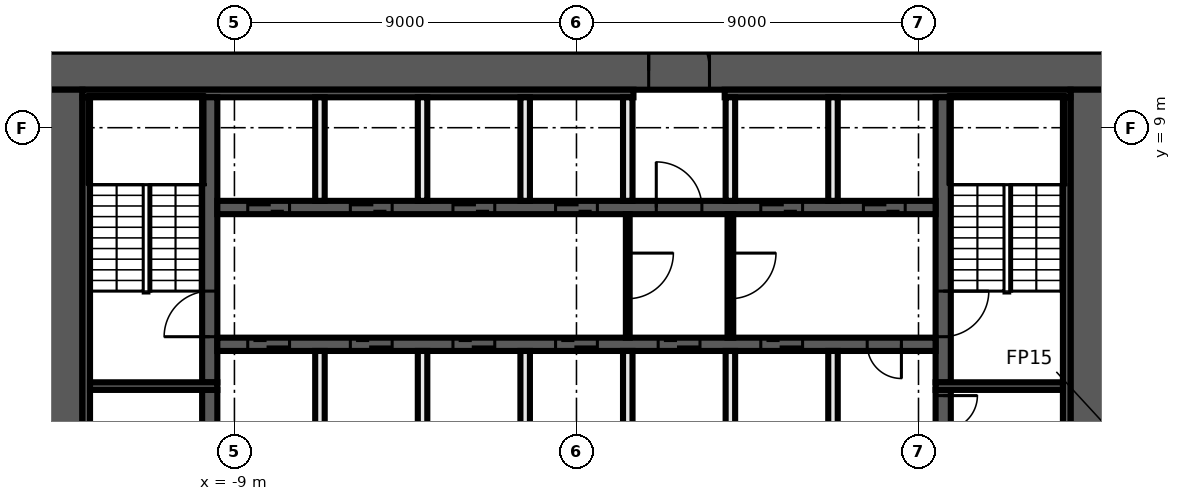
"""IFC4 building model, lengths in metres.
Left out: names, types, materials, properties, quantities, classifications, styles, units other than length and angle.
Written with IfcOpenShell. Run it as: python <this file> out.ifc"""

import sys

from ifc_helpers import new_model, si_unit, direction, frame, frame_2d, origin, place, context, subcontext, project, spatial, rectangle, extrude, element, fill, save


model = new_model("IFC4")
c1 = context("Model", 3, precision=1e-05, world=origin(), true_north=direction((0.0, 1.0)))
c2 = subcontext(c1, "Body", "Model", "MODEL_VIEW")
j1 = project(units=[si_unit("LENGTHUNIT", "METRE"), si_unit("PLANEANGLEUNIT", "RADIAN")], contexts=[c1])
p1 = place(None, origin())
s1 = spatial("IfcSite", under=j1, at=p1, CompositionType="ELEMENT")
p2 = place(p1, origin())
s2 = spatial("IfcBuilding", under=s1, at=p2, CompositionType="ELEMENT")
p3 = place(p2, frame((0.0, 0.0, 132.2)))
s3 = spatial("IfcBuildingStorey", under=s2, at=p3, CompositionType="ELEMENT", Elevation=132.2)
for number, where, z_axis, x_axis in (
    (1, (3.6, 11.0, 0.0), (0.0, 0.0, 1.0), (0.0, 1.0, 0.0)),
    (2, (1.8, 11.0, 0.0), (0.0, 0.0, 1.0), (0.0, 1.0, 0.0)),
):
    element("IfcWall", number, at=place(p3, frame(where, z_axis=z_axis, x_axis=x_axis)), inside=s3, PredefinedType="PARTITIONING", context=c2, shape_type="SweptSolid", body=[
        extrude(rectangle(XDim=0.925, YDim=0.15, at=frame_2d((0.462, 0.0))), origin(), (0.0, 0.0, 1.0), 3.3),
    ])
p4 = place(p3, frame((-14.0, 10.5, 0.0), z_axis=(0.0, 0.0, 1.0), x_axis=(1.0, 0.0, 0.0)))
e3 = element("IfcWall", 3, at=p4, inside=s3, PredefinedType="SHEAR", context=c2, shape_type="SweptSolid", body=[
    extrude(rectangle(XDim=28.0, YDim=1.0, at=frame_2d((14.0, 0.0))), origin(), (0.0, 0.0, 1.0), 3.3),
])
p5 = place(p4, frame((15.9, 0.0, 0.0)))
e4 = element("IfcOpeningElement", 4, at=p5, cuts=e3, PredefinedType="OPENING", context=c2, shape_type="SweptSolid", body=[
    extrude(rectangle(XDim=1.6, YDim=2.1, at=frame_2d((0.8, 1.05))), frame((0.0, 0.51, 0.0), z_axis=(0.0, -1.0, 0.0), x_axis=(1.0, 0.0, 0.0)), (0.0, 0.0, 1.0), 1.02),
])
for number, where, z_axis, x_axis in (
    (5, (13.5, 10.0, 0.0), (0.0, 0.0, 1.0), (0.0, -1.0, 0.0)),
    (6, (-13.5, -10.0, 0.0), (0.0, 0.0, 1.0), (0.0, 1.0, 0.0)),
):
    element("IfcWall", number, at=place(p3, frame(where, z_axis=z_axis, x_axis=x_axis)), inside=s3, PredefinedType="SHEAR", context=c2, shape_type="SweptSolid", body=[
        extrude(rectangle(XDim=20.0, YDim=1.0, at=frame_2d((10.0, 0.0))), origin(), (0.0, 0.0, 1.0), 3.3),
    ])
p6 = place(p3, frame((-13.0, 9.9, 0.0), z_axis=(0.0, 0.0, 1.0), x_axis=(1.0, 0.0, 0.0)))
e7 = element("IfcWall", 7, at=p6, inside=s3, PredefinedType="SHEAR", context=c2, shape_type="SweptSolid", body=[
    extrude(rectangle(XDim=14.5, YDim=0.2, at=frame_2d((7.25, 0.0))), origin(), (0.0, 0.0, 1.0), 3.3),
])
p7 = place(p3, frame((3.9, 9.9, 0.0), z_axis=(0.0, 0.0, 1.0), x_axis=(1.0, 0.0, 0.0)))
e8 = element("IfcWall", 8, at=p7, inside=s3, PredefinedType="SHEAR", context=c2, shape_type="SweptSolid", body=[
    extrude(rectangle(XDim=9.1, YDim=0.2, at=frame_2d((4.55, 0.0))), origin(), (0.0, 0.0, 1.0), 3.3),
])
for number, where, z_axis, x_axis in (
    (9, (12.9, 9.8, 0.0), (0.0, 0.0, 1.0), (0.0, -1.0, 0.0)),
    (10, (-12.9, -9.8, 0.0), (0.0, 0.0, 1.0), (0.0, 1.0, 0.0)),
):
    element("IfcWall", number, at=place(p3, frame(where, z_axis=z_axis, x_axis=x_axis)), inside=s3, PredefinedType="SHEAR", context=c2, shape_type="SweptSolid", body=[
        extrude(rectangle(XDim=19.6, YDim=0.2, at=frame_2d((9.8, 0.0))), origin(), (0.0, 0.0, 1.0), 3.3),
    ])
p8 = place(p3, frame((9.65, 2.1, 0.0), z_axis=(0.0, 0.0, 1.0), x_axis=(0.0, -1.0, 0.0)))
e11 = element("IfcWall", 11, at=p8, inside=s3, PredefinedType="SHEAR", context=c2, shape_type="SweptSolid", body=[
    extrude(rectangle(XDim=4.2, YDim=0.4, at=frame_2d((2.1, 0.0))), origin(), (0.0, 0.0, 1.0), 3.3),
])
p9 = place(p8, frame((0.15, 0.0, 0.0)))
e12 = element("IfcOpeningElement", 12, at=p9, cuts=e11, PredefinedType="OPENING", context=c2, shape_type="SweptSolid", body=[
    extrude(rectangle(XDim=0.9, YDim=2.1, at=frame_2d((0.45, 1.05))), frame((0.0, 0.21, 0.0), z_axis=(0.0, -1.0, 0.0), x_axis=(1.0, 0.0, 0.0)), (0.0, 0.0, 1.0), 0.42),
])
p10 = place(p3, frame((9.65, 9.8, 0.0), z_axis=(0.0, 0.0, 1.0), x_axis=(0.0, -1.0, 0.0)))
e13 = element("IfcWall", 13, at=p10, inside=s3, PredefinedType="SHEAR", context=c2, shape_type="SweptSolid", body=[
    extrude(rectangle(XDim=7.5, YDim=0.4, at=frame_2d((3.75, 0.0))), origin(), (0.0, 0.0, 1.0), 3.3),
])
p11 = place(p10, frame((5.1, 0.0, 0.0)))
e14 = element("IfcOpeningElement", 14, at=p11, cuts=e13, PredefinedType="OPENING", context=c2, shape_type="SweptSolid", body=[
    extrude(rectangle(XDim=1.2, YDim=2.1, at=frame_2d((0.6, 1.05))), frame((0.0, 0.21, 0.0), z_axis=(0.0, -1.0, 0.0), x_axis=(1.0, 0.0, 0.0)), (0.0, 0.0, 1.0), 0.42),
])
p12 = place(p3, frame((-9.65, -2.1, 0.0), z_axis=(0.0, 0.0, 1.0), x_axis=(0.0, 1.0, 0.0)))
e15 = element("IfcWall", 15, at=p12, inside=s3, PredefinedType="SHEAR", context=c2, shape_type="SweptSolid", body=[
    extrude(rectangle(XDim=4.2, YDim=0.4, at=frame_2d((2.1, 0.0))), origin(), (0.0, 0.0, 1.0), 3.3),
])
p13 = place(p3, frame((-9.65, 2.3, 0.0), z_axis=(0.0, 0.0, 1.0), x_axis=(0.0, 1.0, 0.0)))
e16 = element("IfcWall", 16, at=p13, inside=s3, PredefinedType="SHEAR", context=c2, shape_type="SweptSolid", body=[
    extrude(rectangle(XDim=7.5, YDim=0.4, at=frame_2d((3.75, 0.0))), origin(), (0.0, 0.0, 1.0), 3.3),
])
p14 = place(p13, frame((1.2, 0.0, 0.0)))
e17 = element("IfcOpeningElement", 17, at=p14, cuts=e16, PredefinedType="OPENING", context=c2, shape_type="SweptSolid", body=[
    extrude(rectangle(XDim=1.2, YDim=2.1, at=frame_2d((0.6, 1.05))), frame((0.0, 0.21, 0.0), z_axis=(0.0, -1.0, 0.0), x_axis=(1.0, 0.0, 0.0)), (0.0, 0.0, 1.0), 0.42),
])
for number, where, z_axis, x_axis in (
    (18, (9.45, 2.2, 0.0), (0.0, 0.0, 1.0), (1.0, 0.0, 0.0)),
    (19, (-9.45, 2.2, 0.0), (0.0, 0.0, 1.0), (-1.0, 0.0, 0.0)),
):
    element("IfcWall", number, at=place(p3, frame(where, z_axis=z_axis, x_axis=x_axis)), inside=s3, PredefinedType="SHEAR", context=c2, shape_type="SweptSolid", body=[
        extrude(rectangle(XDim=3.35, YDim=0.2, at=frame_2d((1.675, 0.0))), origin(), (0.0, 0.0, 1.0), 3.3),
    ])
p15 = place(p3, frame((-9.45, 6.9, 0.0), z_axis=(0.0, 0.0, 1.0), x_axis=(1.0, 0.0, 0.0)))
e20 = element("IfcWall", 20, at=p15, inside=s3, PredefinedType="SHEAR", context=c2, shape_type="SweptSolid", body=[
    extrude(rectangle(XDim=18.9, YDim=0.35, at=frame_2d((9.45, 0.0))), origin(), (0.0, 0.0, 1.0), 3.3),
])
p16 = place(p15, frame((0.8, 0.0, 0.0)))
e21 = element("IfcOpeningElement", 21, at=p16, cuts=e20, PredefinedType="OPENING", context=c2, shape_type="SweptSolid", body=[
    extrude(rectangle(XDim=1.1, YDim=2.1, at=frame_2d((0.55, 1.05))), frame((0.0, 0.185, 0.0), z_axis=(0.0, -1.0, 0.0), x_axis=(1.0, 0.0, 0.0)), (0.0, 0.0, 1.0), 0.37),
])
p17 = place(p15, frame((3.5, 0.0, 0.0)))
e22 = element("IfcOpeningElement", 22, at=p17, cuts=e20, PredefinedType="OPENING", context=c2, shape_type="SweptSolid", body=[
    extrude(rectangle(XDim=1.1, YDim=2.1, at=frame_2d((0.55, 1.05))), frame((0.0, 0.185, 0.0), z_axis=(0.0, -1.0, 0.0), x_axis=(1.0, 0.0, 0.0)), (0.0, 0.0, 1.0), 0.37),
])
p18 = place(p15, frame((6.2, 0.0, 0.0)))
e23 = element("IfcOpeningElement", 23, at=p18, cuts=e20, PredefinedType="OPENING", context=c2, shape_type="SweptSolid", body=[
    extrude(rectangle(XDim=1.1, YDim=2.1, at=frame_2d((0.55, 1.05))), frame((0.0, 0.185, 0.0), z_axis=(0.0, -1.0, 0.0), x_axis=(1.0, 0.0, 0.0)), (0.0, 0.0, 1.0), 0.37),
])
p19 = place(p15, frame((8.9, 0.0, 0.0)))
e24 = element("IfcOpeningElement", 24, at=p19, cuts=e20, PredefinedType="OPENING", context=c2, shape_type="SweptSolid", body=[
    extrude(rectangle(XDim=1.1, YDim=2.1, at=frame_2d((0.55, 1.05))), frame((0.0, 0.185, 0.0), z_axis=(0.0, -1.0, 0.0), x_axis=(1.0, 0.0, 0.0)), (0.0, 0.0, 1.0), 0.37),
])
p20 = place(p15, frame((11.55, 0.0, 0.0)))
e25 = element("IfcOpeningElement", 25, at=p20, cuts=e20, PredefinedType="OPENING", context=c2, shape_type="SweptSolid", body=[
    extrude(rectangle(XDim=1.2, YDim=2.1, at=frame_2d((0.6, 1.05))), frame((0.0, 0.185, 0.0), z_axis=(0.0, -1.0, 0.0), x_axis=(1.0, 0.0, 0.0)), (0.0, 0.0, 1.0), 0.37),
])
p21 = place(p15, frame((14.3, 0.0, 0.0)))
e26 = element("IfcOpeningElement", 26, at=p21, cuts=e20, PredefinedType="OPENING", context=c2, shape_type="SweptSolid", body=[
    extrude(rectangle(XDim=1.1, YDim=2.1, at=frame_2d((0.55, 1.05))), frame((0.0, 0.185, 0.0), z_axis=(0.0, -1.0, 0.0), x_axis=(1.0, 0.0, 0.0)), (0.0, 0.0, 1.0), 0.37),
])
p22 = place(p15, frame((17.0, 0.0, 0.0)))
e27 = element("IfcOpeningElement", 27, at=p22, cuts=e20, PredefinedType="OPENING", context=c2, shape_type="SweptSolid", body=[
    extrude(rectangle(XDim=1.1, YDim=2.1, at=frame_2d((0.55, 1.05))), frame((0.0, 0.185, 0.0), z_axis=(0.0, -1.0, 0.0), x_axis=(1.0, 0.0, 0.0)), (0.0, 0.0, 1.0), 0.37),
])
p23 = place(p3, frame((9.45, 3.3, 0.0), z_axis=(0.0, 0.0, 1.0), x_axis=(-1.0, 0.0, 0.0)))
e28 = element("IfcWall", 28, at=p23, inside=s3, PredefinedType="SHEAR", context=c2, shape_type="SweptSolid", body=[
    extrude(rectangle(XDim=18.9, YDim=0.35, at=frame_2d((9.45, 0.0))), origin(), (0.0, 0.0, 1.0), 3.3),
])
p24 = place(p23, frame((17.0, 0.0, 0.0)))
e29 = element("IfcOpeningElement", 29, at=p24, cuts=e28, PredefinedType="OPENING", context=c2, shape_type="SweptSolid", body=[
    extrude(rectangle(XDim=1.1, YDim=2.1, at=frame_2d((0.55, 1.05))), frame((0.0, 0.185, 0.0), z_axis=(0.0, -1.0, 0.0), x_axis=(1.0, 0.0, 0.0)), (0.0, 0.0, 1.0), 0.37),
])
p25 = place(p23, frame((14.3, 0.0, 0.0)))
e30 = element("IfcOpeningElement", 30, at=p25, cuts=e28, PredefinedType="OPENING", context=c2, shape_type="SweptSolid", body=[
    extrude(rectangle(XDim=1.1, YDim=2.1, at=frame_2d((0.55, 1.05))), frame((0.0, 0.185, 0.0), z_axis=(0.0, -1.0, 0.0), x_axis=(1.0, 0.0, 0.0)), (0.0, 0.0, 1.0), 0.37),
])
p26 = place(p23, frame((11.6, 0.0, 0.0)))
e31 = element("IfcOpeningElement", 31, at=p26, cuts=e28, PredefinedType="OPENING", context=c2, shape_type="SweptSolid", body=[
    extrude(rectangle(XDim=1.1, YDim=2.1, at=frame_2d((0.55, 1.05))), frame((0.0, 0.185, 0.0), z_axis=(0.0, -1.0, 0.0), x_axis=(1.0, 0.0, 0.0)), (0.0, 0.0, 1.0), 0.37),
])
p27 = place(p23, frame((8.9, 0.0, 0.0)))
e32 = element("IfcOpeningElement", 32, at=p27, cuts=e28, PredefinedType="OPENING", context=c2, shape_type="SweptSolid", body=[
    extrude(rectangle(XDim=1.1, YDim=2.1, at=frame_2d((0.55, 1.05))), frame((0.0, 0.185, 0.0), z_axis=(0.0, -1.0, 0.0), x_axis=(1.0, 0.0, 0.0)), (0.0, 0.0, 1.0), 0.37),
])
p28 = place(p23, frame((6.2, 0.0, 0.0)))
e33 = element("IfcOpeningElement", 33, at=p28, cuts=e28, PredefinedType="OPENING", context=c2, shape_type="SweptSolid", body=[
    extrude(rectangle(XDim=1.1, YDim=2.1, at=frame_2d((0.55, 1.05))), frame((0.0, 0.185, 0.0), z_axis=(0.0, -1.0, 0.0), x_axis=(1.0, 0.0, 0.0)), (0.0, 0.0, 1.0), 0.37),
])
p29 = place(p23, frame((3.5, 0.0, 0.0)))
e34 = element("IfcOpeningElement", 34, at=p29, cuts=e28, PredefinedType="OPENING", context=c2, shape_type="SweptSolid", body=[
    extrude(rectangle(XDim=1.1, YDim=2.1, at=frame_2d((0.55, 1.05))), frame((0.0, 0.185, 0.0), z_axis=(0.0, -1.0, 0.0), x_axis=(1.0, 0.0, 0.0)), (0.0, 0.0, 1.0), 0.37),
])
p30 = place(p23, frame((0.9, 0.0, 0.0)))
e35 = element("IfcOpeningElement", 35, at=p30, cuts=e28, PredefinedType="OPENING", context=c2, shape_type="SweptSolid", body=[
    extrude(rectangle(XDim=0.9, YDim=2.1, at=frame_2d((0.45, 1.05))), frame((0.0, 0.185, 0.0), z_axis=(0.0, -1.0, 0.0), x_axis=(1.0, 0.0, 0.0)), (0.0, 0.0, 1.0), 0.37),
])
for number, where, z_axis, x_axis in (
    (36, (6.75, 0.4, 0.0), (0.0, 0.0, 1.0), (0.0, 1.0, 0.0)),
    (37, (6.75, 7.075, 0.0), (0.0, 0.0, 1.0), (0.0, 1.0, 0.0)),
):
    element("IfcWall", number, at=place(p3, frame(where, z_axis=z_axis, x_axis=x_axis)), inside=s3, PredefinedType="SOLIDWALL", context=c2, shape_type="SweptSolid", body=[
        extrude(rectangle(XDim=2.725, YDim=0.25, at=frame_2d((1.363, 0.0))), origin(), (0.0, 0.0, 1.0), 3.3),
    ])
p31 = place(p3, frame((4.05, 6.725, 0.0), z_axis=(0.0, 0.0, 1.0), x_axis=(0.0, -1.0, 0.0)))
e38 = element("IfcWall", 38, at=p31, inside=s3, PredefinedType="PARTITIONING", context=c2, shape_type="SweptSolid", body=[
    extrude(rectangle(XDim=3.25, YDim=0.15, at=frame_2d((1.625, 0.0))), origin(), (0.0, 0.0, 1.0), 3.3),
])
p32 = place(p31, frame((1.025, 0.0, 0.0)))
e39 = element("IfcOpeningElement", 39, at=p32, cuts=e38, PredefinedType="OPENING", context=c2, shape_type="SweptSolid", body=[
    extrude(rectangle(XDim=1.2, YDim=2.1, at=frame_2d((0.6, 1.05))), frame((0.0, 0.085, 0.0), z_axis=(0.0, -1.0, 0.0), x_axis=(1.0, 0.0, 0.0)), (0.0, 0.0, 1.0), 0.17),
])
for number, where, z_axis, x_axis in (
    (40, (4.05, 0.4, 0.0), (0.0, 0.0, 1.0), (0.0, 1.0, 0.0)),
    (41, (4.05, 7.075, 0.0), (0.0, 0.0, 1.0), (0.0, 1.0, 0.0)),
):
    element("IfcWall", number, at=place(p3, frame(where, z_axis=z_axis, x_axis=x_axis)), inside=s3, PredefinedType="SOLIDWALL", context=c2, shape_type="SweptSolid", body=[
        extrude(rectangle(XDim=2.725, YDim=0.25, at=frame_2d((1.363, 0.0))), origin(), (0.0, 0.0, 1.0), 3.3),
    ])
p33 = place(p3, frame((1.35, 6.725, 0.0), z_axis=(0.0, 0.0, 1.0), x_axis=(0.0, -1.0, 0.0)))
e42 = element("IfcWall", 42, at=p33, inside=s3, PredefinedType="PARTITIONING", context=c2, shape_type="SweptSolid", body=[
    extrude(rectangle(XDim=3.25, YDim=0.1, at=frame_2d((1.625, 0.0))), origin(), (0.0, 0.0, 1.0), 3.3),
])
p34 = place(p33, frame((1.025, 0.0, 0.0)))
e43 = element("IfcOpeningElement", 43, at=p34, cuts=e42, PredefinedType="OPENING", context=c2, shape_type="SweptSolid", body=[
    extrude(rectangle(XDim=1.2, YDim=2.1, at=frame_2d((0.6, 1.05))), frame((0.0, 0.06, 0.0), z_axis=(0.0, -1.0, 0.0), x_axis=(1.0, 0.0, 0.0)), (0.0, 0.0, 1.0), 0.12),
])
for number, where, z_axis, x_axis in (
    (44, (1.35, 0.4, 0.0), (0.0, 0.0, 1.0), (0.0, 1.0, 0.0)),
    (45, (1.35, 7.075, 0.0), (0.0, 0.0, 1.0), (0.0, 1.0, 0.0)),
    (46, (-1.35, 0.4, 0.0), (0.0, 0.0, 1.0), (0.0, 1.0, 0.0)),
    (47, (-1.35, 7.075, 0.0), (0.0, 0.0, 1.0), (0.0, 1.0, 0.0)),
    (48, (-4.05, 0.4, 0.0), (0.0, 0.0, 1.0), (0.0, 1.0, 0.0)),
    (49, (-4.05, 7.075, 0.0), (0.0, 0.0, 1.0), (0.0, 1.0, 0.0)),
    (50, (-6.75, 0.4, 0.0), (0.0, 0.0, 1.0), (0.0, 1.0, 0.0)),
    (51, (-6.75, 7.075, 0.0), (0.0, 0.0, 1.0), (0.0, 1.0, 0.0)),
):
    element("IfcWall", number, at=place(p3, frame(where, z_axis=z_axis, x_axis=x_axis)), inside=s3, PredefinedType="SOLIDWALL", context=c2, shape_type="SweptSolid", body=[
        extrude(rectangle(XDim=2.725, YDim=0.25, at=frame_2d((1.363, 0.0))), origin(), (0.0, 0.0, 1.0), 3.3),
    ])
p35 = place(p9, origin())
e52 = element("IfcDoor", 52, at=p35, inside=s3, OperationType="SINGLE_SWING_RIGHT", PredefinedType="DOOR", context=c2, shape_type="SweptSolid", body=[
    extrude(rectangle(XDim=0.9, YDim=2.1, at=frame_2d((0.45, 1.05))), frame((0.0, 0.025, 0.0), z_axis=(0.0, -1.0, 0.0), x_axis=(1.0, 0.0, 0.0)), (0.0, 0.0, 1.0), 0.05),
])
fill(e12, e52)
p36 = place(p16, origin())
e53 = element("IfcDoor", 53, at=p36, inside=s3, OperationType="DOUBLE_DOOR_SLIDING", PredefinedType="DOOR", context=c2, shape_type="SweptSolid", body=[
    extrude(rectangle(XDim=1.1, YDim=2.1, at=frame_2d((0.55, 1.05))), frame((0.0, 0.025, 0.0), z_axis=(0.0, -1.0, 0.0), x_axis=(1.0, 0.0, 0.0)), (0.0, 0.0, 1.0), 0.05),
])
fill(e21, e53)
p37 = place(p17, origin())
e54 = element("IfcDoor", 54, at=p37, inside=s3, OperationType="DOUBLE_DOOR_SLIDING", PredefinedType="DOOR", context=c2, shape_type="SweptSolid", body=[
    extrude(rectangle(XDim=1.1, YDim=2.1, at=frame_2d((0.55, 1.05))), frame((0.0, 0.025, 0.0), z_axis=(0.0, -1.0, 0.0), x_axis=(1.0, 0.0, 0.0)), (0.0, 0.0, 1.0), 0.05),
])
fill(e22, e54)
p38 = place(p18, origin())
e55 = element("IfcDoor", 55, at=p38, inside=s3, OperationType="DOUBLE_DOOR_SLIDING", PredefinedType="DOOR", context=c2, shape_type="SweptSolid", body=[
    extrude(rectangle(XDim=1.1, YDim=2.1, at=frame_2d((0.55, 1.05))), frame((0.0, 0.025, 0.0), z_axis=(0.0, -1.0, 0.0), x_axis=(1.0, 0.0, 0.0)), (0.0, 0.0, 1.0), 0.05),
])
fill(e23, e55)
p39 = place(p19, origin())
e56 = element("IfcDoor", 56, at=p39, inside=s3, OperationType="DOUBLE_DOOR_SLIDING", PredefinedType="DOOR", context=c2, shape_type="SweptSolid", body=[
    extrude(rectangle(XDim=1.1, YDim=2.1, at=frame_2d((0.55, 1.05))), frame((0.0, 0.025, 0.0), z_axis=(0.0, -1.0, 0.0), x_axis=(1.0, 0.0, 0.0)), (0.0, 0.0, 1.0), 0.05),
])
fill(e24, e56)
p40 = place(p5, origin())
e57 = element("IfcDoor", 57, at=p40, inside=s3, OperationType="DOUBLE_DOOR_SINGLE_SWING", PredefinedType="DOOR", context=c2, shape_type="SweptSolid", body=[
    extrude(rectangle(XDim=1.6, YDim=2.1, at=frame_2d((0.8, 1.05))), frame((0.0, 0.025, 0.0), z_axis=(0.0, -1.0, 0.0), x_axis=(1.0, 0.0, 0.0)), (0.0, 0.0, 1.0), 0.05),
])
fill(e4, e57)
p41 = place(p20, origin())
e58 = element("IfcDoor", 58, at=p41, inside=s3, OperationType="SINGLE_SWING_LEFT", PredefinedType="DOOR", context=c2, shape_type="SweptSolid", body=[
    extrude(rectangle(XDim=1.2, YDim=2.1, at=frame_2d((0.6, 1.05))), frame((0.0, 0.025, 0.0), z_axis=(0.0, -1.0, 0.0), x_axis=(1.0, 0.0, 0.0)), (0.0, 0.0, 1.0), 0.05),
])
fill(e25, e58)
p42 = place(p21, origin())
e59 = element("IfcDoor", 59, at=p42, inside=s3, OperationType="DOUBLE_DOOR_SLIDING", PredefinedType="DOOR", context=c2, shape_type="SweptSolid", body=[
    extrude(rectangle(XDim=1.1, YDim=2.1, at=frame_2d((0.55, 1.05))), frame((0.0, 0.025, 0.0), z_axis=(0.0, -1.0, 0.0), x_axis=(1.0, 0.0, 0.0)), (0.0, 0.0, 1.0), 0.05),
])
fill(e26, e59)
p43 = place(p22, origin())
e60 = element("IfcDoor", 60, at=p43, inside=s3, OperationType="DOUBLE_DOOR_SLIDING", PredefinedType="DOOR", context=c2, shape_type="SweptSolid", body=[
    extrude(rectangle(XDim=1.1, YDim=2.1, at=frame_2d((0.55, 1.05))), frame((0.0, 0.025, 0.0), z_axis=(0.0, -1.0, 0.0), x_axis=(1.0, 0.0, 0.0)), (0.0, 0.0, 1.0), 0.05),
])
fill(e27, e60)
p44 = place(p24, origin())
e61 = element("IfcDoor", 61, at=p44, inside=s3, OperationType="DOUBLE_DOOR_SLIDING", PredefinedType="DOOR", context=c2, shape_type="SweptSolid", body=[
    extrude(rectangle(XDim=1.1, YDim=2.1, at=frame_2d((0.55, 1.05))), frame((0.0, 0.025, 0.0), z_axis=(0.0, -1.0, 0.0), x_axis=(1.0, 0.0, 0.0)), (0.0, 0.0, 1.0), 0.05),
])
fill(e29, e61)
p45 = place(p25, origin())
e62 = element("IfcDoor", 62, at=p45, inside=s3, OperationType="DOUBLE_DOOR_SLIDING", PredefinedType="DOOR", context=c2, shape_type="SweptSolid", body=[
    extrude(rectangle(XDim=1.1, YDim=2.1, at=frame_2d((0.55, 1.05))), frame((0.0, 0.025, 0.0), z_axis=(0.0, -1.0, 0.0), x_axis=(1.0, 0.0, 0.0)), (0.0, 0.0, 1.0), 0.05),
])
fill(e30, e62)
p46 = place(p26, origin())
e63 = element("IfcDoor", 63, at=p46, inside=s3, OperationType="DOUBLE_DOOR_SLIDING", PredefinedType="DOOR", context=c2, shape_type="SweptSolid", body=[
    extrude(rectangle(XDim=1.1, YDim=2.1, at=frame_2d((0.55, 1.05))), frame((0.0, 0.025, 0.0), z_axis=(0.0, -1.0, 0.0), x_axis=(1.0, 0.0, 0.0)), (0.0, 0.0, 1.0), 0.05),
])
fill(e31, e63)
p47 = place(p27, origin())
e64 = element("IfcDoor", 64, at=p47, inside=s3, OperationType="DOUBLE_DOOR_SLIDING", PredefinedType="DOOR", context=c2, shape_type="SweptSolid", body=[
    extrude(rectangle(XDim=1.1, YDim=2.1, at=frame_2d((0.55, 1.05))), frame((0.0, 0.025, 0.0), z_axis=(0.0, -1.0, 0.0), x_axis=(1.0, 0.0, 0.0)), (0.0, 0.0, 1.0), 0.05),
])
fill(e32, e64)
p48 = place(p28, origin())
e65 = element("IfcDoor", 65, at=p48, inside=s3, OperationType="DOUBLE_DOOR_SLIDING", PredefinedType="DOOR", context=c2, shape_type="SweptSolid", body=[
    extrude(rectangle(XDim=1.1, YDim=2.1, at=frame_2d((0.55, 1.05))), frame((0.0, 0.025, 0.0), z_axis=(0.0, -1.0, 0.0), x_axis=(1.0, 0.0, 0.0)), (0.0, 0.0, 1.0), 0.05),
])
fill(e33, e65)
p49 = place(p29, origin())
e66 = element("IfcDoor", 66, at=p49, inside=s3, OperationType="DOUBLE_DOOR_SLIDING", PredefinedType="DOOR", context=c2, shape_type="SweptSolid", body=[
    extrude(rectangle(XDim=1.1, YDim=2.1, at=frame_2d((0.55, 1.05))), frame((0.0, 0.025, 0.0), z_axis=(0.0, -1.0, 0.0), x_axis=(1.0, 0.0, 0.0)), (0.0, 0.0, 1.0), 0.05),
])
fill(e34, e66)
p50 = place(p30, origin())
e67 = element("IfcDoor", 67, at=p50, inside=s3, OperationType="SINGLE_SWING_LEFT", PredefinedType="DOOR", context=c2, shape_type="SweptSolid", body=[
    extrude(rectangle(XDim=0.9, YDim=2.1, at=frame_2d((0.45, 1.05))), frame((0.0, 0.025, 0.0), z_axis=(0.0, -1.0, 0.0), x_axis=(1.0, 0.0, 0.0)), (0.0, 0.0, 1.0), 0.05),
])
fill(e35, e67)
p51 = place(p11, origin())
e68 = element("IfcDoor", 68, at=p51, inside=s3, OperationType="SINGLE_SWING_LEFT", PredefinedType="DOOR", context=c2, shape_type="SweptSolid", body=[
    extrude(rectangle(XDim=1.2, YDim=2.1, at=frame_2d((0.6, 1.05))), frame((0.0, 0.025, 0.0), z_axis=(0.0, -1.0, 0.0), x_axis=(1.0, 0.0, 0.0)), (0.0, 0.0, 1.0), 0.05),
])
fill(e14, e68)
p52 = place(p14, origin())
e69 = element("IfcDoor", 69, at=p52, inside=s3, OperationType="SINGLE_SWING_RIGHT", PredefinedType="DOOR", context=c2, shape_type="SweptSolid", body=[
    extrude(rectangle(XDim=1.2, YDim=2.1, at=frame_2d((0.6, 1.05))), frame((0.0, 0.025, 0.0), z_axis=(0.0, -1.0, 0.0), x_axis=(1.0, 0.0, 0.0)), (0.0, 0.0, 1.0), 0.05),
])
fill(e17, e69)
p53 = place(p34, origin())
e70 = element("IfcDoor", 70, at=p53, inside=s3, OperationType="SINGLE_SWING_LEFT", PredefinedType="DOOR", context=c2, shape_type="SweptSolid", body=[
    extrude(rectangle(XDim=1.2, YDim=2.1, at=frame_2d((0.6, 1.05))), frame((0.0, 0.025, 0.0), z_axis=(0.0, -1.0, 0.0), x_axis=(1.0, 0.0, 0.0)), (0.0, 0.0, 1.0), 0.05),
])
fill(e43, e70)
p54 = place(p32, origin())
e71 = element("IfcDoor", 71, at=p54, inside=s3, OperationType="SINGLE_SWING_RIGHT", PredefinedType="DOOR", context=c2, shape_type="SweptSolid", body=[
    extrude(rectangle(XDim=1.2, YDim=2.1, at=frame_2d((0.6, 1.05))), frame((0.0, 0.025, 0.0), z_axis=(0.0, -1.0, 0.0), x_axis=(1.0, 0.0, 0.0)), (0.0, 0.0, 1.0), 0.05),
])
fill(e39, e71)
save(model, sys.argv[1])
